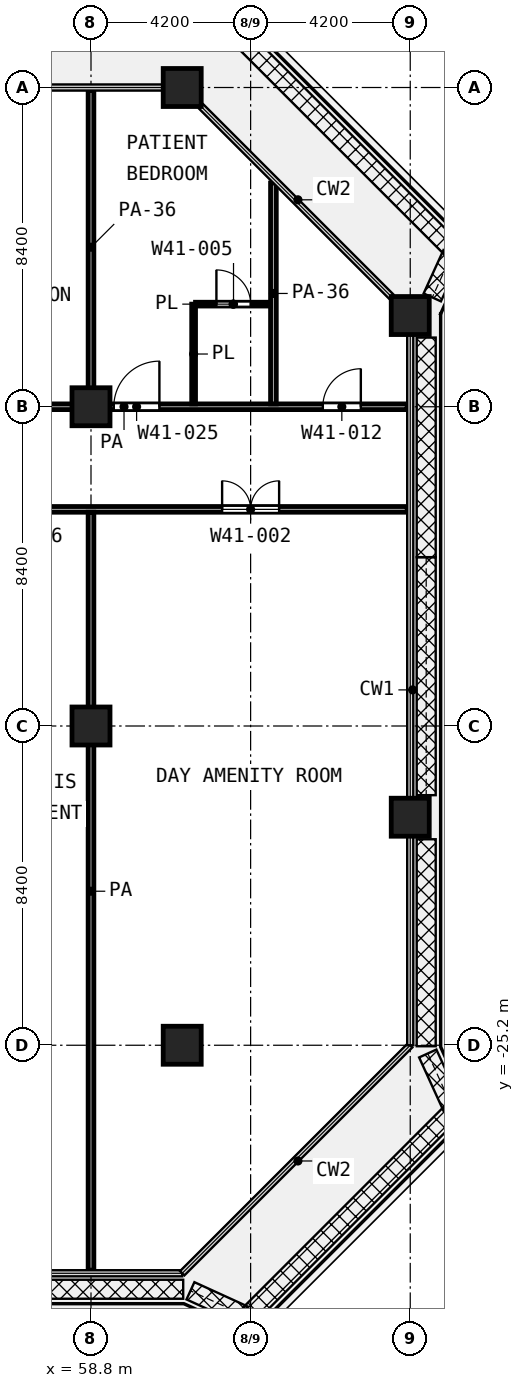
"""IFC4 building model, lengths in metres.
Left out: names, types, materials, properties, quantities, classifications, styles, units other than length and angle.
Written with IfcOpenShell. Run it as: python <this file> out.ifc"""

import sys

from ifc_helpers import new_model, si_unit, direction, frame, frame_2d, origin, origin_2d, place, context, subcontext, project, spatial, rectangle, extrude, element, fill, save


model = new_model("IFC4")
c1 = context("Model", 3, precision=1e-05, world=origin(), true_north=direction((0.0, 1.0)))
c2 = subcontext(c1, "Body", "Model", "MODEL_VIEW")
j1 = project(units=[si_unit("LENGTHUNIT", "METRE"), si_unit("PLANEANGLEUNIT", "RADIAN")], contexts=[c1])
p1 = place(None, origin())
s1 = spatial("IfcSite", under=j1, at=p1, CompositionType="ELEMENT")
p2 = place(p1, origin())
s2 = spatial("IfcBuilding", under=s1, at=p2, CompositionType="ELEMENT")
p3 = place(p2, frame((0.0, 0.0, 200.4)))
s3 = spatial("IfcBuildingStorey", under=s2, at=p3, CompositionType="ELEMENT", Elevation=200.4)
for number, where, z_axis, x_axis in (
    (1, (61.2, 0.0, 0.0), (0.0, 0.0, 1.0), (1.0, 0.0, 0.0)),
    (2, (67.2, -6.0, 0.0), (0.0, 0.0, 1.0), (1.0, 0.0, 0.0)),
    (3, (58.8, -8.4, 0.0), (0.0, 0.0, 1.0), (1.0, 0.0, 0.0)),
    (4, (58.8, -16.8, 0.0), (0.0, 0.0, 1.0), (1.0, 0.0, 0.0)),
    (5, (67.2, -19.2, 0.0), (0.0, 0.0, 1.0), (1.0, 0.0, 0.0)),
    (6, (61.2, -25.2, 0.0), (0.0, 0.0, 1.0), (1.0, 0.0, 0.0)),
):
    element("IfcColumn", number, at=place(p3, frame(where, z_axis=z_axis, x_axis=x_axis)), inside=s3, PredefinedType="COLUMN", context=c2, shape_type="SweptSolid", body=[
        extrude(rectangle(XDim=1.0, YDim=1.0, at=origin_2d()), origin(), (0.0, 0.0, 1.0), 4.2),
    ])
p4 = place(p3, frame((61.55, -5.7, 0.0), z_axis=(0.0, 0.0, 1.0), x_axis=(1.0, 0.0, 0.0)))
e7 = element("IfcWall", 7, at=p4, inside=s3, PredefinedType="PARTITIONING", context=c2, shape_type="SweptSolid", body=[
    extrude(rectangle(XDim=1.975, YDim=0.1, at=frame_2d((0.987, 0.0))), origin(), (0.0, 0.0, 1.0), 3.6),
])
p5 = place(p4, frame((0.55, 0.0, 0.0)))
e8 = element("IfcOpeningElement", 8, at=p5, cuts=e7, PredefinedType="OPENING", context=c2, shape_type="SweptSolid", body=[
    extrude(rectangle(XDim=0.9, YDim=2.1, at=frame_2d((0.45, 1.05))), frame((0.0, 0.06, 0.0), z_axis=(0.0, -1.0, 0.0), x_axis=(1.0, 0.0, 0.0)), (0.0, 0.0, 1.0), 0.12),
])
p6 = place(p3, frame((61.5, -8.325, 0.0), z_axis=(0.0, 0.0, 1.0), x_axis=(0.0, 1.0, 0.0)))
e9 = element("IfcWall", 9, at=p6, inside=s3, PredefinedType="PARTITIONING", context=c2, shape_type="SweptSolid", body=[
    extrude(rectangle(XDim=2.625, YDim=0.1, at=frame_2d((1.312, 0.0))), origin(), (0.0, 0.0, 1.0), 3.6),
])
p7 = place(p3, frame((29.475, -11.1, 0.0), z_axis=(0.0, 0.0, 1.0), x_axis=(1.0, 0.0, 0.0)))
e10 = element("IfcWall", 10, at=p7, inside=s3, PredefinedType="PARTITIONING", context=c2, shape_type="SweptSolid", body=[
    extrude(rectangle(XDim=37.645, YDim=0.15, at=frame_2d((18.823, 0.0))), origin(), (0.0, 0.0, 1.0), 3.6),
])
p8 = place(p7, frame((3.225, 0.0, 0.0)))
e11 = element("IfcOpeningElement", 11, at=p8, cuts=e10, PredefinedType="OPENING", context=c2, shape_type="SweptSolid", body=[
    extrude(rectangle(XDim=1.2, YDim=2.1, at=frame_2d((0.6, 1.05))), frame((0.0, 0.085, 0.0), z_axis=(0.0, -1.0, 0.0), x_axis=(1.0, 0.0, 0.0)), (0.0, 0.0, 1.0), 0.17),
])
p9 = place(p7, frame((9.625, 0.0, 0.0)))
e12 = element("IfcOpeningElement", 12, at=p9, cuts=e10, PredefinedType="OPENING", context=c2, shape_type="SweptSolid", body=[
    extrude(rectangle(XDim=1.0, YDim=2.1, at=frame_2d((0.5, 1.05))), frame((0.0, 0.085, 0.0), z_axis=(0.0, -1.0, 0.0), x_axis=(1.0, 0.0, 0.0)), (0.0, 0.0, 1.0), 0.17),
])
p10 = place(p7, frame((14.125, 0.0, 0.0)))
e13 = element("IfcOpeningElement", 13, at=p10, cuts=e10, PredefinedType="OPENING", context=c2, shape_type="SweptSolid", body=[
    extrude(rectangle(XDim=1.0, YDim=2.1, at=frame_2d((0.5, 1.05))), frame((0.0, 0.085, 0.0), z_axis=(0.0, -1.0, 0.0), x_axis=(1.0, 0.0, 0.0)), (0.0, 0.0, 1.0), 0.17),
])
p11 = place(p7, frame((18.225, 0.0, 0.0)))
e14 = element("IfcOpeningElement", 14, at=p11, cuts=e10, PredefinedType="OPENING", context=c2, shape_type="SweptSolid", body=[
    extrude(rectangle(XDim=1.2, YDim=2.1, at=frame_2d((0.6, 1.05))), frame((0.0, 0.085, 0.0), z_axis=(0.0, -1.0, 0.0), x_axis=(1.0, 0.0, 0.0)), (0.0, 0.0, 1.0), 0.17),
])
p12 = place(p7, frame((22.825, 0.0, 0.0)))
e15 = element("IfcOpeningElement", 15, at=p12, cuts=e10, PredefinedType="OPENING", context=c2, shape_type="SweptSolid", body=[
    extrude(rectangle(XDim=1.0, YDim=2.1, at=frame_2d((0.5, 1.05))), frame((0.0, 0.085, 0.0), z_axis=(0.0, -1.0, 0.0), x_axis=(1.0, 0.0, 0.0)), (0.0, 0.0, 1.0), 0.17),
])
p13 = place(p7, frame((27.025, 0.0, 0.0)))
e16 = element("IfcOpeningElement", 16, at=p13, cuts=e10, PredefinedType="OPENING", context=c2, shape_type="SweptSolid", body=[
    extrude(rectangle(XDim=1.0, YDim=2.1, at=frame_2d((0.5, 1.05))), frame((0.0, 0.085, 0.0), z_axis=(0.0, -1.0, 0.0), x_axis=(1.0, 0.0, 0.0)), (0.0, 0.0, 1.0), 0.17),
])
p14 = place(p7, frame((32.775, 0.0, 0.0)))
e17 = element("IfcOpeningElement", 17, at=p14, cuts=e10, PredefinedType="OPENING", context=c2, shape_type="SweptSolid", body=[
    extrude(rectangle(XDim=1.5, YDim=2.1, at=frame_2d((0.75, 1.05))), frame((0.0, 0.085, 0.0), z_axis=(0.0, -1.0, 0.0), x_axis=(1.0, 0.0, 0.0)), (0.0, 0.0, 1.0), 0.17),
])
p15 = place(p3, frame((52.218, -8.4, 0.0), z_axis=(0.0, 0.0, 1.0), x_axis=(1.0, 0.0, 0.0)))
e18 = element("IfcWall", 18, at=p15, inside=s3, PredefinedType="PARTITIONING", context=c2, shape_type="SweptSolid", body=[
    extrude(rectangle(XDim=14.902, YDim=0.15, at=frame_2d((7.451, 0.0))), origin(), (0.0, 0.0, 1.0), 3.6),
])
p16 = place(p15, frame((3.982, 0.0, 0.0)))
e19 = element("IfcOpeningElement", 19, at=p16, cuts=e18, PredefinedType="OPENING", context=c2, shape_type="SweptSolid", body=[
    extrude(rectangle(XDim=1.0, YDim=2.1, at=frame_2d((0.5, 1.05))), frame((0.0, 0.085, 0.0), z_axis=(0.0, -1.0, 0.0), x_axis=(1.0, 0.0, 0.0)), (0.0, 0.0, 1.0), 0.17),
])
p17 = place(p15, frame((7.182, 0.0, 0.0)))
e20 = element("IfcOpeningElement", 20, at=p17, cuts=e18, PredefinedType="OPENING", context=c2, shape_type="SweptSolid", body=[
    extrude(rectangle(XDim=1.2, YDim=2.1, at=frame_2d((0.6, 1.05))), frame((0.0, 0.085, 0.0), z_axis=(0.0, -1.0, 0.0), x_axis=(1.0, 0.0, 0.0)), (0.0, 0.0, 1.0), 0.17),
])
p18 = place(p15, frame((12.682, 0.0, 0.0)))
e21 = element("IfcOpeningElement", 21, at=p18, cuts=e18, PredefinedType="OPENING", context=c2, shape_type="SweptSolid", body=[
    extrude(rectangle(XDim=1.0, YDim=2.1, at=frame_2d((0.5, 1.05))), frame((0.0, 0.085, 0.0), z_axis=(0.0, -1.0, 0.0), x_axis=(1.0, 0.0, 0.0)), (0.0, 0.0, 1.0), 0.17),
])
p19 = place(p3, frame((58.8, -31.12, 0.0), z_axis=(0.0, 0.0, 1.0), x_axis=(0.0, 1.0, 0.0)))
e22 = element("IfcWall", 22, at=p19, inside=s3, PredefinedType="PARTITIONING", context=c2, shape_type="SweptSolid", body=[
    extrude(rectangle(XDim=19.945, YDim=0.15, at=frame_2d((9.973, 0.0))), origin(), (0.0, 0.0, 1.0), 3.6),
])
p20 = place(p3, frame((58.8, -8.325, 0.0), z_axis=(0.0, 0.0, 1.0), x_axis=(0.0, 1.0, 0.0)))
e23 = element("IfcWall", 23, at=p20, inside=s3, PredefinedType="PARTITIONING", context=c2, shape_type="SweptSolid", body=[
    extrude(rectangle(XDim=8.245, YDim=0.15, at=frame_2d((4.123, 0.0))), origin(), (0.0, 0.0, 1.0), 2.7),
])
p21 = place(p3, frame((63.6, -8.325, 0.0), z_axis=(0.0, 0.0, 1.0), x_axis=(0.0, 1.0, 0.0)))
e24 = element("IfcWall", 24, at=p21, inside=s3, PredefinedType="PARTITIONING", context=c2, shape_type="SweptSolid", body=[
    extrude(rectangle(XDim=5.812, YDim=0.15, at=frame_2d((2.906, 0.0))), origin(), (0.0, 0.0, 1.0), 2.7),
])
p22 = place(p17, origin())
e25 = element("IfcDoor", 25, at=p22, inside=s3, OperationType="SINGLE_SWING_RIGHT", PredefinedType="DOOR", context=c2, shape_type="SweptSolid", body=[
    extrude(rectangle(XDim=1.2, YDim=2.1, at=frame_2d((0.6, 1.05))), frame((0.0, 0.025, 0.0), z_axis=(0.0, -1.0, 0.0), x_axis=(1.0, 0.0, 0.0)), (0.0, 0.0, 1.0), 0.05),
])
fill(e20, e25)
p23 = place(p5, origin())
e26 = element("IfcDoor", 26, at=p23, inside=s3, OperationType="SINGLE_SWING_LEFT", PredefinedType="DOOR", context=c2, shape_type="SweptSolid", body=[
    extrude(rectangle(XDim=0.9, YDim=2.1, at=frame_2d((0.45, 1.05))), frame((0.0, 0.025, 0.0), z_axis=(0.0, -1.0, 0.0), x_axis=(1.0, 0.0, 0.0)), (0.0, 0.0, 1.0), 0.05),
])
fill(e8, e26)
p24 = place(p18, origin())
e27 = element("IfcDoor", 27, at=p24, inside=s3, OperationType="SINGLE_SWING_RIGHT", PredefinedType="DOOR", context=c2, shape_type="SweptSolid", body=[
    extrude(rectangle(XDim=1.0, YDim=2.1, at=frame_2d((0.5, 1.05))), frame((0.0, 0.025, 0.0), z_axis=(0.0, -1.0, 0.0), x_axis=(1.0, 0.0, 0.0)), (0.0, 0.0, 1.0), 0.05),
])
fill(e21, e27)
p25 = place(p14, origin())
e28 = element("IfcDoor", 28, at=p25, inside=s3, OperationType="DOUBLE_DOOR_SINGLE_SWING", PredefinedType="DOOR", context=c2, shape_type="SweptSolid", body=[
    extrude(rectangle(XDim=1.5, YDim=2.1, at=frame_2d((0.75, 1.05))), frame((0.0, 0.025, 0.0), z_axis=(0.0, -1.0, 0.0), x_axis=(1.0, 0.0, 0.0)), (0.0, 0.0, 1.0), 0.05),
])
fill(e17, e28)
save(model, sys.argv[1])
